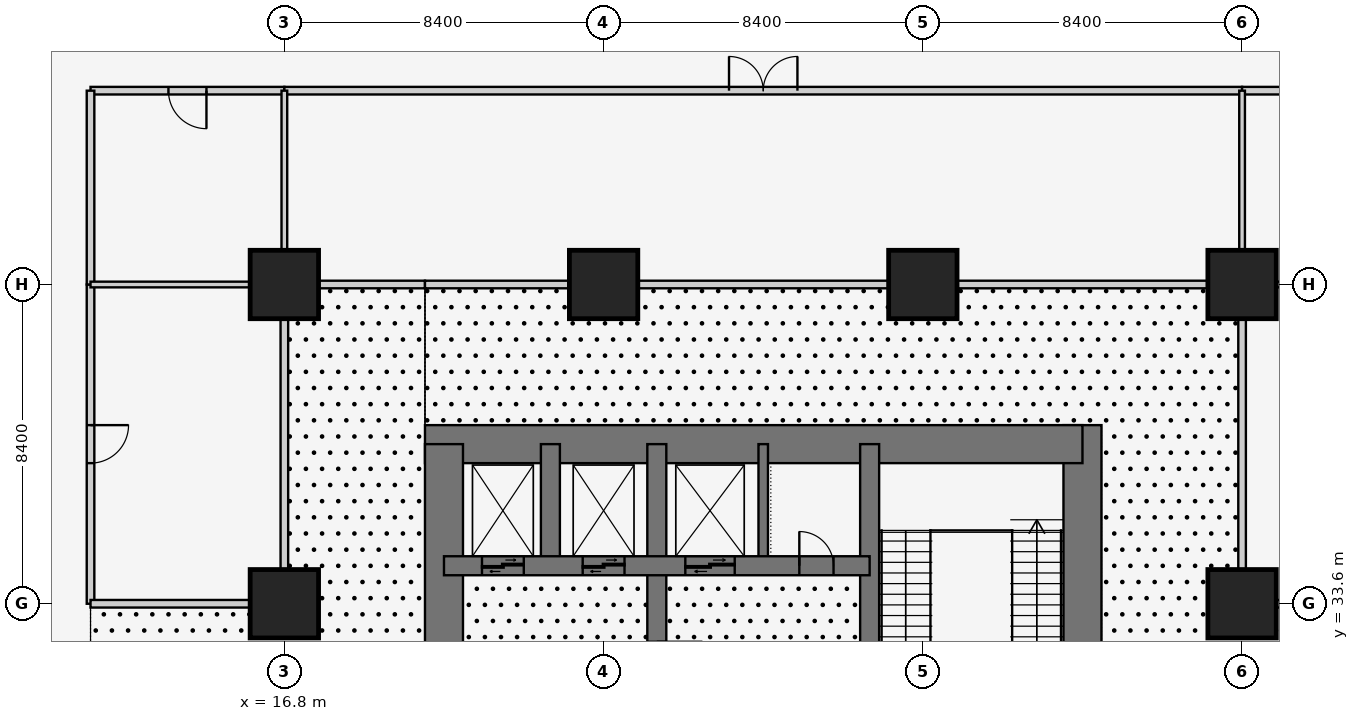
"""IFC4 building model, lengths in metres.
Left out: names, types, materials, properties, quantities, classifications, styles, units other than length and angle.
Written with IfcOpenShell. Run it as: python <this file> out.ifc"""

import sys

from ifc_helpers import new_model, si_unit, direction, frame, frame_2d, origin, origin_2d, place, context, subcontext, project, spatial, rectangle, extrude, element, fill, save


model = new_model("IFC4")
c1 = context("Model", 3, precision=1e-05, world=origin(), true_north=direction((0.0, 1.0)))
c2 = subcontext(c1, "Body", "Model", "MODEL_VIEW")
j1 = project(units=[si_unit("LENGTHUNIT", "METRE"), si_unit("PLANEANGLEUNIT", "RADIAN")], contexts=[c1])
p1 = place(None, origin())
s1 = spatial("IfcSite", under=j1, at=p1, CompositionType="ELEMENT")
p2 = place(p1, origin())
s2 = spatial("IfcBuilding", under=s1, at=p2, CompositionType="ELEMENT")
p3 = place(p2, origin())
s3 = spatial("IfcBuildingStorey", under=s2, at=p3, CompositionType="ELEMENT", Elevation=0.0)
for number, where, z_axis, x_axis in (
    (1, (16.8, 33.6, 0.0), (0.0, 0.0, 1.0), (1.0, 0.0, 0.0)),
    (2, (16.8, 42.0, 0.0), (0.0, 0.0, 1.0), (1.0, 0.0, 0.0)),
    (3, (25.2, 42.0, 0.0), (0.0, 0.0, 1.0), (1.0, 0.0, 0.0)),
    (4, (33.6, 42.0, 0.0), (0.0, 0.0, 1.0), (1.0, 0.0, 0.0)),
    (5, (42.0, 33.6, 0.0), (0.0, 0.0, 1.0), (1.0, 0.0, 0.0)),
    (6, (42.0, 42.0, 0.0), (0.0, 0.0, 1.0), (1.0, 0.0, 0.0)),
):
    element("IfcColumn", number, at=place(p3, frame(where, z_axis=z_axis, x_axis=x_axis)), inside=s3, PredefinedType="COLUMN", context=c2, shape_type="SweptSolid", body=[
        extrude(rectangle(XDim=1.8, YDim=1.8, at=origin_2d()), origin(), (0.0, 0.0, 1.0), 6.0),
    ])
p4 = place(p3, frame((37.8, 21.0, 0.0), z_axis=(0.0, 0.0, 1.0), x_axis=(0.0, 1.0, 0.0)))
e7 = element("IfcWall", 7, at=p4, inside=s3, PredefinedType="SHEAR", context=c2, shape_type="SweptSolid", body=[
    extrude(rectangle(XDim=17.3, YDim=1.0, at=frame_2d((8.65, 0.0))), origin(), (0.0, 0.0, 1.0), 6.0),
])
p5 = place(p4, frame((5.2, 0.0, 0.0)))
e8 = element("IfcOpeningElement", 8, at=p5, cuts=e7, PredefinedType="OPENING", context=c2, shape_type="SweptSolid", body=[
    extrude(rectangle(XDim=1.2, YDim=2.1, at=frame_2d((0.6, 1.05))), frame((0.0, 0.51, 0.0), z_axis=(0.0, -1.0, 0.0), x_axis=(1.0, 0.0, 0.0)), (0.0, 0.0, 1.0), 1.02),
])
p6 = place(p3, frame((37.8, 37.8, 0.0), z_axis=(0.0, 0.0, 1.0), x_axis=(-1.0, 0.0, 0.0)))
e9 = element("IfcWall", 9, at=p6, inside=s3, PredefinedType="SHEAR", context=c2, shape_type="SweptSolid", body=[
    extrude(rectangle(XDim=17.3, YDim=1.0, at=frame_2d((8.65, 0.0))), origin(), (0.0, 0.0, 1.0), 6.0),
])
p7 = place(p3, frame((21.0, 37.8, 0.0), z_axis=(0.0, 0.0, 1.0), x_axis=(0.0, -1.0, 0.0)))
e10 = element("IfcWall", 10, at=p7, inside=s3, PredefinedType="SHEAR", context=c2, shape_type="SweptSolid", body=[
    extrude(rectangle(XDim=17.3, YDim=1.0, at=frame_2d((8.65, 0.0))), origin(), (0.0, 0.0, 1.0), 6.0),
])
p8 = place(p7, frame((5.4, 0.0, 0.0)))
e11 = element("IfcOpeningElement", 11, at=p8, cuts=e10, PredefinedType="OPENING", context=c2, shape_type="SweptSolid", body=[
    extrude(rectangle(XDim=1.2, YDim=2.1, at=frame_2d((0.6, 1.05))), frame((0.0, 0.51, 0.0), z_axis=(0.0, -1.0, 0.0), x_axis=(1.0, 0.0, 0.0)), (0.0, 0.0, 1.0), 1.02),
])
p9 = place(p3, frame((26.6, 21.0, 0.0), z_axis=(0.0, 0.0, 1.0), x_axis=(0.0, 1.0, 0.0)))
e12 = element("IfcWall", 12, at=p9, inside=s3, PredefinedType="SHEAR", context=c2, shape_type="SweptSolid", body=[
    extrude(rectangle(XDim=16.8, YDim=0.5, at=frame_2d((8.4, 0.0))), origin(), (0.0, 0.0, 1.0), 6.0),
])
p10 = place(p9, frame((10.4, 0.0, 0.0)))
e13 = element("IfcOpeningElement", 13, at=p10, cuts=e12, PredefinedType="OPENING", context=c2, shape_type="SweptSolid", body=[
    extrude(rectangle(XDim=1.2, YDim=2.1, at=frame_2d((0.6, 1.05))), frame((0.0, 0.26, 0.0), z_axis=(0.0, -1.0, 0.0), x_axis=(1.0, 0.0, 0.0)), (0.0, 0.0, 1.0), 0.52),
])
p11 = place(p3, frame((21.0, 34.6, 0.0), z_axis=(0.0, 0.0, 1.0), x_axis=(1.0, 0.0, 0.0)))
e14 = element("IfcWall", 14, at=p11, inside=s3, PredefinedType="SHEAR", context=c2, shape_type="SweptSolid", body=[
    extrude(rectangle(XDim=11.2, YDim=0.5, at=frame_2d((5.6, 0.0))), origin(), (0.0, 0.0, 1.0), 6.0),
])
p12 = place(p11, frame((9.35, 0.0, 0.0)))
e15 = element("IfcOpeningElement", 15, at=p12, cuts=e14, PredefinedType="OPENING", context=c2, shape_type="SweptSolid", body=[
    extrude(rectangle(XDim=0.9, YDim=2.1, at=frame_2d((0.45, 1.05))), frame((0.0, 0.26, 0.0), z_axis=(0.0, -1.0, 0.0), x_axis=(1.0, 0.0, 0.0)), (0.0, 0.0, 1.0), 0.52),
])
p13 = place(p11, frame((1.0, 0.0, 0.0)))
e16 = element("IfcOpeningElement", 16, at=p13, cuts=e14, PredefinedType="OPENING", context=c2, shape_type="SweptSolid", body=[
    extrude(rectangle(XDim=1.1, YDim=2.1, at=frame_2d((0.55, 1.05))), frame((0.0, 0.26, 0.0), z_axis=(0.0, -1.0, 0.0), x_axis=(1.0, 0.0, 0.0)), (0.0, 0.0, 1.0), 0.52),
])
p14 = place(p11, frame((3.65, 0.0, 0.0)))
e17 = element("IfcOpeningElement", 17, at=p14, cuts=e14, PredefinedType="OPENING", context=c2, shape_type="SweptSolid", body=[
    extrude(rectangle(XDim=1.1, YDim=2.1, at=frame_2d((0.55, 1.05))), frame((0.0, 0.26, 0.0), z_axis=(0.0, -1.0, 0.0), x_axis=(1.0, 0.0, 0.0)), (0.0, 0.0, 1.0), 0.52),
])
p15 = place(p11, frame((6.35, 0.0, 0.0)))
e18 = element("IfcOpeningElement", 18, at=p15, cuts=e14, PredefinedType="OPENING", context=c2, shape_type="SweptSolid", body=[
    extrude(rectangle(XDim=1.3, YDim=2.1, at=frame_2d((0.65, 1.05))), frame((0.0, 0.26, 0.0), z_axis=(0.0, -1.0, 0.0), x_axis=(1.0, 0.0, 0.0)), (0.0, 0.0, 1.0), 0.52),
])
p16 = place(p3, frame((23.8, 34.6, 0.0), z_axis=(0.0, 0.0, 1.0), x_axis=(0.0, 1.0, 0.0)))
e19 = element("IfcWall", 19, at=p16, inside=s3, PredefinedType="SHEAR", context=c2, shape_type="SweptSolid", body=[
    extrude(rectangle(XDim=3.2, YDim=0.5, at=frame_2d((1.6, 0.0))), origin(), (0.0, 0.0, 1.0), 6.0),
])
p17 = place(p3, frame((32.2, 29.15, 0.0), z_axis=(0.0, 0.0, 1.0), x_axis=(0.0, 1.0, 0.0)))
e20 = element("IfcWall", 20, at=p17, inside=s3, PredefinedType="SHEAR", context=c2, shape_type="SweptSolid", body=[
    extrude(rectangle(XDim=8.65, YDim=0.5, at=frame_2d((4.325, 0.0))), origin(), (0.0, 0.0, 1.0), 6.0),
])
p18 = place(p3, frame((29.4, 34.6, 0.0), z_axis=(0.0, 0.0, 1.0), x_axis=(0.0, 1.0, 0.0)))
e21 = element("IfcWall", 21, at=p18, inside=s3, PredefinedType="SHEAR", context=c2, shape_type="SweptSolid", body=[
    extrude(rectangle(XDim=3.2, YDim=0.25, at=frame_2d((1.6, 0.0))), origin(), (0.0, 0.0, 1.0), 6.0),
])
p19 = place(p3, frame((11.7, 42.0, 0.0), z_axis=(0.0, 0.0, 1.0), x_axis=(0.0, -1.0, 0.0)))
e22 = element("IfcWall", 22, at=p19, inside=s3, PredefinedType="PARTITIONING", context=c2, shape_type="SweptSolid", body=[
    extrude(rectangle(XDim=8.4, YDim=0.2, at=frame_2d((4.2, 0.0))), origin(), (0.0, 0.0, 1.0), 5.8),
])
p20 = place(p19, frame((3.7, 0.0, 0.0)))
e23 = element("IfcOpeningElement", 23, at=p20, cuts=e22, PredefinedType="OPENING", context=c2, shape_type="SweptSolid", body=[
    extrude(rectangle(XDim=1.0, YDim=2.1, at=frame_2d((0.5, 1.05))), frame((0.0, 0.11, 0.0), z_axis=(0.0, -1.0, 0.0), x_axis=(1.0, 0.0, 0.0)), (0.0, 0.0, 1.0), 0.22),
])
p21 = place(p3, frame((16.8, 47.1, 0.0), z_axis=(0.0, 0.0, 1.0), x_axis=(-1.0, 0.0, 0.0)))
e24 = element("IfcWall", 24, at=p21, inside=s3, PredefinedType="PARTITIONING", context=c2, shape_type="SweptSolid", body=[
    extrude(rectangle(XDim=5.1, YDim=0.2, at=frame_2d((2.55, 0.0))), origin(), (0.0, 0.0, 1.0), 5.8),
])
p22 = place(p21, frame((2.05, 0.0, 0.0)))
e25 = element("IfcOpeningElement", 25, at=p22, cuts=e24, PredefinedType="OPENING", context=c2, shape_type="SweptSolid", body=[
    extrude(rectangle(XDim=1.0, YDim=2.1, at=frame_2d((0.5, 1.05))), frame((0.0, 0.11, 0.0), z_axis=(0.0, -1.0, 0.0), x_axis=(1.0, 0.0, 0.0)), (0.0, 0.0, 1.0), 0.22),
])
p23 = place(p3, frame((11.7, 47.1, 0.0), z_axis=(0.0, 0.0, 1.0), x_axis=(0.0, -1.0, 0.0)))
e26 = element("IfcWall", 26, at=p23, inside=s3, PredefinedType="PARTITIONING", context=c2, shape_type="SweptSolid", body=[
    extrude(rectangle(XDim=5.1, YDim=0.2, at=frame_2d((2.55, 0.0))), origin(), (0.0, 0.0, 1.0), 5.8),
])
p24 = place(p3, frame((42.0, 47.1, 0.0), z_axis=(0.0, 0.0, 1.0), x_axis=(-1.0, 0.0, 0.0)))
e27 = element("IfcWall", 27, at=p24, inside=s3, PredefinedType="PARTITIONING", context=c2, shape_type="SweptSolid", body=[
    extrude(rectangle(XDim=25.2, YDim=0.2, at=frame_2d((12.6, 0.0))), origin(), (0.0, 0.0, 1.0), 5.8),
])
p25 = place(p24, frame((11.7, 0.0, 0.0)))
e28 = element("IfcOpeningElement", 28, at=p25, cuts=e27, PredefinedType="OPENING", context=c2, shape_type="SweptSolid", body=[
    extrude(rectangle(XDim=1.8, YDim=2.4, at=frame_2d((0.9, 1.2))), frame((0.0, 0.11, 0.0), z_axis=(0.0, -1.0, 0.0), x_axis=(1.0, 0.0, 0.0)), (0.0, 0.0, 1.0), 0.22),
])
p26 = place(p3, frame((47.1, 47.1, 0.0), z_axis=(0.0, 0.0, 1.0), x_axis=(-1.0, 0.0, 0.0)))
e29 = element("IfcWall", 29, at=p26, inside=s3, PredefinedType="PARTITIONING", context=c2, shape_type="SweptSolid", body=[
    extrude(rectangle(XDim=5.1, YDim=0.2, at=frame_2d((2.55, 0.0))), origin(), (0.0, 0.0, 1.0), 5.8),
])
p27 = place(p3, frame((11.7, 33.6, 0.0), z_axis=(0.0, 0.0, 1.0), x_axis=(1.0, 0.0, 0.0)))
e30 = element("IfcWall", 30, at=p27, inside=s3, PredefinedType="PARTITIONING", context=c2, shape_type="SweptSolid", body=[
    extrude(rectangle(XDim=4.2, YDim=0.2, at=frame_2d((2.1, 0.0))), origin(), (0.0, 0.0, 1.0), 5.043),
])
p28 = place(p3, frame((16.8, 34.5, 0.0), z_axis=(0.0, 0.0, 1.0), x_axis=(0.0, 1.0, 0.0)))
e31 = element("IfcWall", 31, at=p28, inside=s3, PredefinedType="PARTITIONING", context=c2, shape_type="SweptSolid", body=[
    extrude(rectangle(XDim=6.6, YDim=0.2, at=frame_2d((3.3, 0.0))), origin(), (0.0, 0.0, 1.0), 5.043),
])
p29 = place(p3, frame((17.7, 42.0, 0.0), z_axis=(0.0, 0.0, 1.0), x_axis=(1.0, 0.0, 0.0)))
e32 = element("IfcWall", 32, at=p29, inside=s3, PredefinedType="PARTITIONING", context=c2, shape_type="SweptSolid", body=[
    extrude(rectangle(XDim=2.8, YDim=0.2, at=frame_2d((1.4, 0.0))), origin(), (0.0, 0.0, 1.0), 5.043),
])
p30 = place(p3, frame((42.0, 41.1, 0.0), z_axis=(0.0, 0.0, 1.0), x_axis=(0.0, -1.0, 0.0)))
e33 = element("IfcWall", 33, at=p30, inside=s3, PredefinedType="PARTITIONING", context=c2, shape_type="SweptSolid", body=[
    extrude(rectangle(XDim=6.6, YDim=0.2, at=frame_2d((3.3, 0.0))), origin(), (0.0, 0.0, 1.0), 5.043),
])
p31 = place(p3, frame((42.9, 33.6, 0.0), z_axis=(0.0, 0.0, 1.0), x_axis=(1.0, 0.0, 0.0)))
e34 = element("IfcWall", 34, at=p31, inside=s3, PredefinedType="PARTITIONING", context=c2, shape_type="SweptSolid", body=[
    extrude(rectangle(XDim=4.2, YDim=0.2, at=frame_2d((2.1, 0.0))), origin(), (0.0, 0.0, 1.0), 5.043),
])
p32 = place(p3, frame((20.5, 42.0, 0.0), z_axis=(0.0, 0.0, 1.0), x_axis=(1.0, 0.0, 0.0)))
e35 = element("IfcWall", 35, at=p32, inside=s3, PredefinedType="PARTITIONING", context=c2, shape_type="SweptSolid", body=[
    extrude(rectangle(XDim=3.8, YDim=0.2, at=frame_2d((1.9, 0.0))), origin(), (0.0, 0.0, 1.0), 5.043),
])
p33 = place(p3, frame((26.1, 42.0, 0.0), z_axis=(0.0, 0.0, 1.0), x_axis=(1.0, 0.0, 0.0)))
e36 = element("IfcWall", 36, at=p33, inside=s3, PredefinedType="PARTITIONING", context=c2, shape_type="SweptSolid", body=[
    extrude(rectangle(XDim=6.6, YDim=0.2, at=frame_2d((3.3, 0.0))), origin(), (0.0, 0.0, 1.0), 5.043),
])
p34 = place(p3, frame((34.5, 42.0, 0.0), z_axis=(0.0, 0.0, 1.0), x_axis=(1.0, 0.0, 0.0)))
e37 = element("IfcWall", 37, at=p34, inside=s3, PredefinedType="PARTITIONING", context=c2, shape_type="SweptSolid", body=[
    extrude(rectangle(XDim=6.6, YDim=0.2, at=frame_2d((3.3, 0.0))), origin(), (0.0, 0.0, 1.0), 5.043),
])
p35 = place(p3, frame((11.7, 42.0, 0.0), z_axis=(0.0, 0.0, 1.0), x_axis=(1.0, 0.0, 0.0)))
e38 = element("IfcWall", 38, at=p35, inside=s3, PredefinedType="PARTITIONING", context=c2, shape_type="SweptSolid", body=[
    extrude(rectangle(XDim=4.2, YDim=0.15, at=frame_2d((2.1, 0.0))), origin(), (0.0, 0.0, 1.0), 5.043),
])
for number, where, z_axis, x_axis in (
    (39, (42.9, 42.0, 0.0), (0.0, 0.0, 1.0), (1.0, 0.0, 0.0)),
    (40, (16.8, 47.1, 0.0), (0.0, 0.0, 1.0), (0.0, -1.0, 0.0)),
    (41, (42.0, 47.1, 0.0), (0.0, 0.0, 1.0), (0.0, -1.0, 0.0)),
):
    element("IfcWall", number, at=place(p3, frame(where, z_axis=z_axis, x_axis=x_axis)), inside=s3, PredefinedType="PARTITIONING", context=c2, shape_type="SweptSolid", body=[
        extrude(rectangle(XDim=4.2, YDim=0.15, at=frame_2d((2.1, 0.0))), origin(), (0.0, 0.0, 1.0), 5.043),
    ])
p36 = place(p20, origin())
e42 = element("IfcDoor", 42, at=p36, inside=s3, OperationType="SINGLE_SWING_LEFT", PredefinedType="DOOR", context=c2, shape_type="SweptSolid", body=[
    extrude(rectangle(XDim=1.0, YDim=2.1, at=frame_2d((0.5, 1.05))), frame((0.0, 0.025, 0.0), z_axis=(0.0, -1.0, 0.0), x_axis=(1.0, 0.0, 0.0)), (0.0, 0.0, 1.0), 0.05),
])
fill(e23, e42)
p37 = place(p22, origin())
e43 = element("IfcDoor", 43, at=p37, inside=s3, OperationType="SINGLE_SWING_LEFT", PredefinedType="DOOR", context=c2, shape_type="SweptSolid", body=[
    extrude(rectangle(XDim=1.0, YDim=2.1, at=frame_2d((0.5, 1.05))), frame((0.0, 0.025, 0.0), z_axis=(0.0, -1.0, 0.0), x_axis=(1.0, 0.0, 0.0)), (0.0, 0.0, 1.0), 0.05),
])
fill(e25, e43)
p38 = place(p25, frame((1.8, 0.0, 0.0), z_axis=(0.0, 0.0, 1.0), x_axis=(-1.0, 0.0, 0.0)))
e44 = element("IfcDoor", 44, at=p38, inside=s3, OperationType="DOUBLE_DOOR_SINGLE_SWING", PredefinedType="DOOR", context=c2, shape_type="SweptSolid", body=[
    extrude(rectangle(XDim=1.8, YDim=2.4, at=frame_2d((0.9, 1.2))), frame((0.0, 0.025, 0.0), z_axis=(0.0, -1.0, 0.0), x_axis=(1.0, 0.0, 0.0)), (0.0, 0.0, 1.0), 0.05),
])
fill(e28, e44)
p39 = place(p12, origin())
e45 = element("IfcDoor", 45, at=p39, inside=s3, OperationType="SINGLE_SWING_LEFT", PredefinedType="DOOR", context=c2, shape_type="SweptSolid", body=[
    extrude(rectangle(XDim=0.9, YDim=2.1, at=frame_2d((0.45, 1.05))), frame((0.0, 0.025, 0.0), z_axis=(0.0, -1.0, 0.0), x_axis=(1.0, 0.0, 0.0)), (0.0, 0.0, 1.0), 0.05),
])
fill(e15, e45)
p40 = place(p13, origin())
e46 = element("IfcDoor", 46, at=p40, inside=s3, OperationType="DOUBLE_DOOR_SLIDING", PredefinedType="DOOR", context=c2, shape_type="SweptSolid", body=[
    extrude(rectangle(XDim=1.1, YDim=2.1, at=frame_2d((0.55, 1.05))), frame((0.0, 0.025, 0.0), z_axis=(0.0, -1.0, 0.0), x_axis=(1.0, 0.0, 0.0)), (0.0, 0.0, 1.0), 0.05),
])
fill(e16, e46)
p41 = place(p14, origin())
e47 = element("IfcDoor", 47, at=p41, inside=s3, OperationType="DOUBLE_DOOR_SLIDING", PredefinedType="DOOR", context=c2, shape_type="SweptSolid", body=[
    extrude(rectangle(XDim=1.1, YDim=2.1, at=frame_2d((0.55, 1.05))), frame((0.0, 0.025, 0.0), z_axis=(0.0, -1.0, 0.0), x_axis=(1.0, 0.0, 0.0)), (0.0, 0.0, 1.0), 0.05),
])
fill(e17, e47)
p42 = place(p15, origin())
e48 = element("IfcDoor", 48, at=p42, inside=s3, OperationType="DOUBLE_DOOR_SLIDING", PredefinedType="DOOR", context=c2, shape_type="SweptSolid", body=[
    extrude(rectangle(XDim=1.3, YDim=2.1, at=frame_2d((0.65, 1.05))), frame((0.0, 0.025, 0.0), z_axis=(0.0, -1.0, 0.0), x_axis=(1.0, 0.0, 0.0)), (0.0, 0.0, 1.0), 0.05),
])
fill(e18, e48)
save(model, sys.argv[1])
